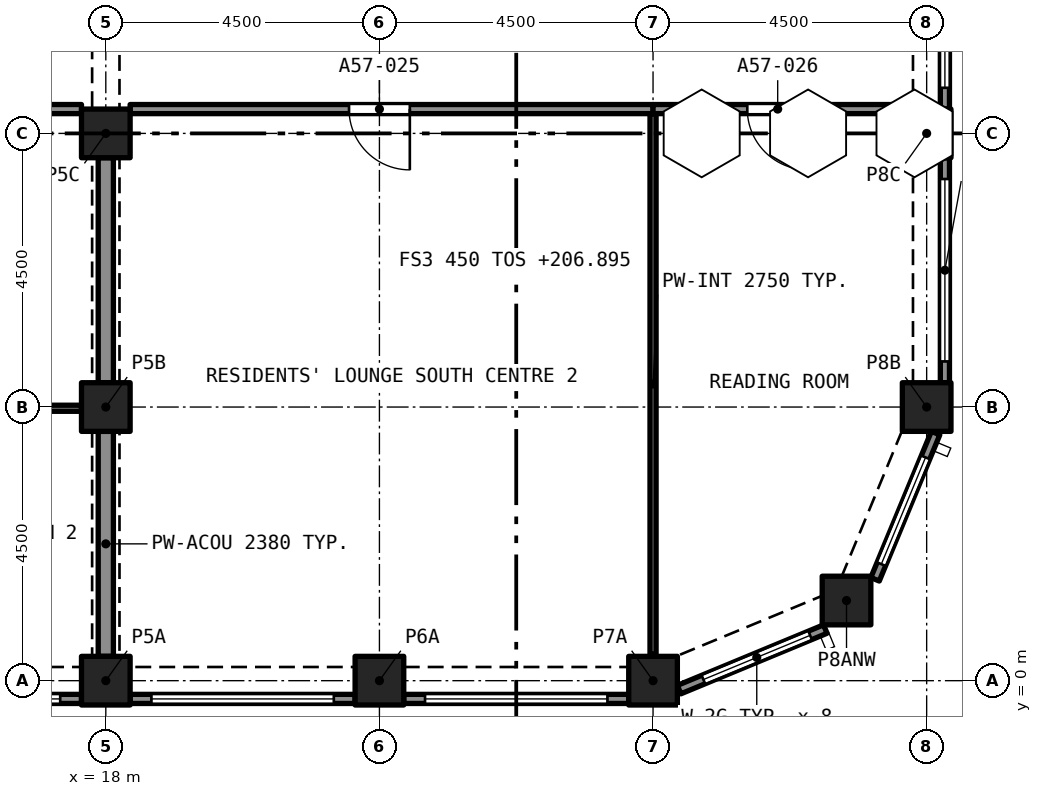
"""IFC4 building model, lengths in metres.
Left out: names, types, materials, properties, quantities, classifications, styles, units other than length and angle.
Written with IfcOpenShell. Run it as: python <this file> out.ifc"""

import sys

from ifc_helpers import new_model, si_unit, direction, frame, frame_2d, origin, origin_2d, place, context, subcontext, project, spatial, rectangle, extrude, element, fill, save


model = new_model("IFC4")
c1 = context("Model", 3, precision=1e-05, world=origin(), true_north=direction((0.0, 1.0)))
c2 = subcontext(c1, "Body", "Model", "MODEL_VIEW")
j1 = project(units=[si_unit("LENGTHUNIT", "METRE"), si_unit("PLANEANGLEUNIT", "RADIAN")], contexts=[c1])
p1 = place(None, origin())
s1 = spatial("IfcSite", under=j1, at=p1, CompositionType="ELEMENT")
p2 = place(p1, origin())
s2 = spatial("IfcBuilding", under=s1, at=p2, CompositionType="ELEMENT")
p3 = place(p2, frame((0.0, 0.0, 206.895)))
s3 = spatial("IfcBuildingStorey", under=s2, at=p3, CompositionType="ELEMENT", Elevation=206.895)
for number, where, z_axis, x_axis in (
    (1, (18.0, 0.0, 0.0), (0.0, 0.0, 1.0), (1.0, 0.0, 0.0)),
    (2, (22.5, 0.0, 0.0), (0.0, 0.0, 1.0), (1.0, 0.0, 0.0)),
    (3, (27.0, 0.0, 0.0), (0.0, 0.0, 1.0), (1.0, 0.0, 0.0)),
    (4, (30.182, 1.318, 0.0), (0.0, 0.0, 1.0), (1.0, 0.0, 0.0)),
    (5, (18.0, 4.5, 0.0), (0.0, 0.0, 1.0), (1.0, 0.0, 0.0)),
    (6, (31.5, 4.5, 0.0), (0.0, 0.0, 1.0), (1.0, 0.0, 0.0)),
    (7, (18.0, 9.0, 0.0), (0.0, 0.0, 1.0), (1.0, 0.0, 0.0)),
    (8, (31.5, 9.0, 0.0), (0.0, 0.0, 1.0), (1.0, 0.0, 0.0)),
):
    element("IfcColumn", number, at=place(p3, frame(where, z_axis=z_axis, x_axis=x_axis)), inside=s3, PredefinedType="COLUMN", context=c2, shape_type="SweptSolid", body=[
        extrude(rectangle(XDim=0.8, YDim=0.8, at=origin_2d()), origin(), (0.0, 0.0, 1.0), 3.2),
    ])
p4 = place(p3, frame((29.833, 0.849, 0.0), z_axis=(0.0, 0.0, 1.0), x_axis=(-0.923885342263, -0.382669406082, 0.0)))
e9 = element("IfcWall", 9, at=p4, inside=s3, PredefinedType="SOLIDWALL", context=c2, shape_type="SweptSolid", body=[
    extrude(rectangle(XDim=2.602, YDim=0.15, at=frame_2d((1.301, 0.0))), origin(), (0.0, 0.0, 1.0), 3.2),
])
p5 = place(p4, frame((0.27, 0.0, 0.45)))
e10 = element("IfcOpeningElement", 10, at=p5, cuts=e9, PredefinedType="OPENING", context=c2, shape_type="SweptSolid", body=[
    extrude(rectangle(XDim=1.9, YDim=1.95, at=frame_2d((0.95, 0.975))), frame((0.0, 0.085, 0.0), z_axis=(0.0, -1.0, 0.0), x_axis=(1.0, 0.0, 0.0)), (0.0, 0.0, 1.0), 0.17),
])
p6 = place(p3, frame((31.647, 4.071, 0.0), z_axis=(0.0, 0.0, 1.0), x_axis=(-0.382669406082, -0.923885342263, 0.0)))
e11 = element("IfcWall", 11, at=p6, inside=s3, PredefinedType="SOLIDWALL", context=c2, shape_type="SweptSolid", body=[
    extrude(rectangle(XDim=2.602, YDim=0.15, at=frame_2d((1.301, 0.0))), origin(), (0.0, 0.0, 1.0), 3.2),
])
p7 = place(p6, frame((0.432, 0.0, 0.45)))
e12 = element("IfcOpeningElement", 12, at=p7, cuts=e11, PredefinedType="OPENING", context=c2, shape_type="SweptSolid", body=[
    extrude(rectangle(XDim=1.9, YDim=1.95, at=frame_2d((0.95, 0.975))), frame((0.0, 0.085, 0.0), z_axis=(0.0, -1.0, 0.0), x_axis=(1.0, 0.0, 0.0)), (0.0, 0.0, 1.0), 0.17),
])
p8 = place(p3, frame((31.8, 8.6, 0.0), z_axis=(0.0, 0.0, 1.0), x_axis=(0.0, -1.0, 0.0)))
e13 = element("IfcWall", 13, at=p8, inside=s3, PredefinedType="SOLIDWALL", context=c2, shape_type="SweptSolid", body=[
    extrude(rectangle(XDim=3.7, YDim=0.15, at=frame_2d((1.85, 0.0))), origin(), (0.0, 0.0, 1.0), 3.2),
])
p9 = place(p8, frame((0.35, 0.0, 0.45)))
e14 = element("IfcOpeningElement", 14, at=p9, cuts=e13, PredefinedType="OPENING", context=c2, shape_type="SweptSolid", body=[
    extrude(rectangle(XDim=3.0, YDim=1.95, at=frame_2d((1.5, 0.975))), frame((0.0, 0.085, 0.0), z_axis=(0.0, -1.0, 0.0), x_axis=(1.0, 0.0, 0.0)), (0.0, 0.0, 1.0), 0.17),
])
p10 = place(p3, frame((31.8, 13.1, 0.0), z_axis=(0.0, 0.0, 1.0), x_axis=(0.0, -1.0, 0.0)))
e15 = element("IfcWall", 15, at=p10, inside=s3, PredefinedType="SOLIDWALL", context=c2, shape_type="SweptSolid", body=[
    extrude(rectangle(XDim=3.7, YDim=0.15, at=frame_2d((1.85, 0.0))), origin(), (0.0, 0.0, 1.0), 3.2),
])
p11 = place(p10, frame((0.35, 0.0, 0.45)))
e16 = element("IfcOpeningElement", 16, at=p11, cuts=e15, PredefinedType="OPENING", context=c2, shape_type="SweptSolid", body=[
    extrude(rectangle(XDim=3.0, YDim=1.95, at=frame_2d((1.5, 0.975))), frame((0.0, 0.085, 0.0), z_axis=(0.0, -1.0, 0.0), x_axis=(1.0, 0.0, 0.0)), (0.0, 0.0, 1.0), 0.17),
])
p12 = place(p3, frame((17.6, -0.3, 0.0), z_axis=(0.0, 0.0, 1.0), x_axis=(-1.0, 0.0, 0.0)))
e17 = element("IfcWall", 17, at=p12, inside=s3, PredefinedType="SOLIDWALL", context=c2, shape_type="SweptSolid", body=[
    extrude(rectangle(XDim=3.7, YDim=0.15, at=frame_2d((1.85, 0.0))), origin(), (0.0, 0.0, 1.0), 3.2),
])
p13 = place(p12, frame((0.35, 0.0, 0.45)))
e18 = element("IfcOpeningElement", 18, at=p13, cuts=e17, PredefinedType="OPENING", context=c2, shape_type="SweptSolid", body=[
    extrude(rectangle(XDim=3.0, YDim=1.95, at=frame_2d((1.5, 0.975))), frame((0.0, 0.085, 0.0), z_axis=(0.0, -1.0, 0.0), x_axis=(1.0, 0.0, 0.0)), (0.0, 0.0, 1.0), 0.17),
])
p14 = place(p3, frame((22.1, -0.3, 0.0), z_axis=(0.0, 0.0, 1.0), x_axis=(-1.0, 0.0, 0.0)))
e19 = element("IfcWall", 19, at=p14, inside=s3, PredefinedType="SOLIDWALL", context=c2, shape_type="SweptSolid", body=[
    extrude(rectangle(XDim=3.7, YDim=0.15, at=frame_2d((1.85, 0.0))), origin(), (0.0, 0.0, 1.0), 3.2),
])
p15 = place(p14, frame((0.35, 0.0, 0.45)))
e20 = element("IfcOpeningElement", 20, at=p15, cuts=e19, PredefinedType="OPENING", context=c2, shape_type="SweptSolid", body=[
    extrude(rectangle(XDim=3.0, YDim=1.95, at=frame_2d((1.5, 0.975))), frame((0.0, 0.085, 0.0), z_axis=(0.0, -1.0, 0.0), x_axis=(1.0, 0.0, 0.0)), (0.0, 0.0, 1.0), 0.17),
])
p16 = place(p3, frame((26.6, -0.3, 0.0), z_axis=(0.0, 0.0, 1.0), x_axis=(-1.0, 0.0, 0.0)))
e21 = element("IfcWall", 21, at=p16, inside=s3, PredefinedType="SOLIDWALL", context=c2, shape_type="SweptSolid", body=[
    extrude(rectangle(XDim=3.7, YDim=0.15, at=frame_2d((1.85, 0.0))), origin(), (0.0, 0.0, 1.0), 3.2),
])
p17 = place(p16, frame((0.35, 0.0, 0.45)))
e22 = element("IfcOpeningElement", 22, at=p17, cuts=e21, PredefinedType="OPENING", context=c2, shape_type="SweptSolid", body=[
    extrude(rectangle(XDim=3.0, YDim=1.95, at=frame_2d((1.5, 0.975))), frame((0.0, 0.085, 0.0), z_axis=(0.0, -1.0, 0.0), x_axis=(1.0, 0.0, 0.0)), (0.0, 0.0, 1.0), 0.17),
])
p18 = place(p3, frame((17.6, 4.48, 0.0), z_axis=(0.0, 0.0, 1.0), x_axis=(-1.0, 0.0, 0.0)))
e23 = element("IfcWall", 23, at=p18, inside=s3, PredefinedType="PARTITIONING", context=c2, shape_type="SweptSolid", body=[
    extrude(rectangle(XDim=4.1, YDim=0.1, at=frame_2d((2.05, 0.0))), origin(), (0.0, 0.0, 1.0), 2.9),
])
p19 = place(p18, frame((1.4, 0.0, 0.0)))
e24 = element("IfcOpeningElement", 24, at=p19, cuts=e23, PredefinedType="OPENING", context=c2, shape_type="SweptSolid", body=[
    extrude(rectangle(XDim=0.9, YDim=2.1, at=frame_2d((0.45, 1.05))), frame((0.0, 0.06, 0.0), z_axis=(0.0, -1.0, 0.0), x_axis=(1.0, 0.0, 0.0)), (0.0, 0.0, 1.0), 0.12),
])
for number, where, z_axis, x_axis in (
    (25, (18.0, 0.4, 0.0), (0.0, 0.0, 1.0), (0.0, 1.0, 0.0)),
    (26, (18.0, 4.9, 0.0), (0.0, 0.0, 1.0), (0.0, 1.0, 0.0)),
):
    element("IfcWall", number, at=place(p3, frame(where, z_axis=z_axis, x_axis=x_axis)), inside=s3, PredefinedType="PARTITIONING", context=c2, shape_type="SweptSolid", body=[
        extrude(rectangle(XDim=3.7, YDim=0.25, at=frame_2d((1.85, 0.0))), origin(), (0.0, 0.0, 1.0), 2.38),
    ])
p20 = place(p3, frame((17.6, 9.4, 0.0), z_axis=(0.0, 0.0, 1.0), x_axis=(-1.0, 0.0, 0.0)))
e27 = element("IfcWall", 27, at=p20, inside=s3, PredefinedType="PARTITIONING", context=c2, shape_type="SweptSolid", body=[
    extrude(rectangle(XDim=2.65, YDim=0.15, at=frame_2d((1.325, 0.0))), origin(), (0.0, 0.0, 1.0), 2.9),
])
p21 = place(p20, frame((1.25, 0.0, 0.0)))
e28 = element("IfcOpeningElement", 28, at=p21, cuts=e27, PredefinedType="OPENING", context=c2, shape_type="SweptSolid", body=[
    extrude(rectangle(XDim=1.2, YDim=2.4, at=frame_2d((0.6, 1.2))), frame((0.0, 0.085, 0.0), z_axis=(0.0, -1.0, 0.0), x_axis=(1.0, 0.0, 0.0)), (0.0, 0.0, 1.0), 0.17),
])
p22 = place(p3, frame((27.0, 0.433, 0.0), z_axis=(0.0, 0.0, 1.0), x_axis=(0.0, 1.0, 0.0)))
e29 = element("IfcWall", 29, at=p22, inside=s3, PredefinedType="PARTITIONING", context=c2, shape_type="SweptSolid", body=[
    extrude(rectangle(XDim=8.892, YDim=0.1, at=frame_2d((4.446, 0.0))), origin(), (0.0, 0.0, 1.0), 2.75),
])
p23 = place(p3, frame((27.0, 9.4, 0.0), z_axis=(0.0, 0.0, 1.0), x_axis=(-1.0, 0.0, 0.0)))
e30 = element("IfcWall", 30, at=p23, inside=s3, PredefinedType="PARTITIONING", context=c2, shape_type="SweptSolid", body=[
    extrude(rectangle(XDim=8.6, YDim=0.15, at=frame_2d((4.3, 0.0))), origin(), (0.0, 0.0, 1.0), 2.75),
])
p24 = place(p23, frame((4.0, 0.0, 0.0)))
e31 = element("IfcOpeningElement", 31, at=p24, cuts=e30, PredefinedType="OPENING", context=c2, shape_type="SweptSolid", body=[
    extrude(rectangle(XDim=1.0, YDim=2.1, at=frame_2d((0.5, 1.05))), frame((0.0, 0.085, 0.0), z_axis=(0.0, -1.0, 0.0), x_axis=(1.0, 0.0, 0.0)), (0.0, 0.0, 1.0), 0.17),
])
p25 = place(p3, frame((31.1, 9.4, 0.0), z_axis=(0.0, 0.0, 1.0), x_axis=(-1.0, 0.0, 0.0)))
e32 = element("IfcWall", 32, at=p25, inside=s3, PredefinedType="PARTITIONING", context=c2, shape_type="SweptSolid", body=[
    extrude(rectangle(XDim=4.1, YDim=0.15, at=frame_2d((2.05, 0.0))), origin(), (0.0, 0.0, 1.0), 2.75),
])
p26 = place(p25, frame((1.55, 0.0, 0.0)))
e33 = element("IfcOpeningElement", 33, at=p26, cuts=e32, PredefinedType="OPENING", context=c2, shape_type="SweptSolid", body=[
    extrude(rectangle(XDim=1.0, YDim=2.1, at=frame_2d((0.5, 1.05))), frame((0.0, 0.085, 0.0), z_axis=(0.0, -1.0, 0.0), x_axis=(1.0, 0.0, 0.0)), (0.0, 0.0, 1.0), 0.17),
])
p27 = place(p5, origin())
e34 = element("IfcWindow", 34, at=p27, inside=s3, PartitioningType="SINGLE_PANEL", PredefinedType="WINDOW", context=c2, shape_type="SweptSolid", body=[
    extrude(rectangle(XDim=1.9, YDim=1.95, at=frame_2d((0.95, 0.975))), frame((0.0, 0.03, 0.0), z_axis=(0.0, -1.0, 0.0), x_axis=(1.0, 0.0, 0.0)), (0.0, 0.0, 1.0), 0.06),
])
fill(e10, e34)
p28 = place(p7, origin())
e35 = element("IfcWindow", 35, at=p28, inside=s3, PartitioningType="SINGLE_PANEL", PredefinedType="WINDOW", context=c2, shape_type="SweptSolid", body=[
    extrude(rectangle(XDim=1.9, YDim=1.95, at=frame_2d((0.95, 0.975))), frame((0.0, 0.03, 0.0), z_axis=(0.0, -1.0, 0.0), x_axis=(1.0, 0.0, 0.0)), (0.0, 0.0, 1.0), 0.06),
])
fill(e12, e35)
p29 = place(p9, origin())
e36 = element("IfcWindow", 36, at=p29, inside=s3, PartitioningType="SINGLE_PANEL", PredefinedType="WINDOW", context=c2, shape_type="SweptSolid", body=[
    extrude(rectangle(XDim=3.0, YDim=1.95, at=frame_2d((1.5, 0.975))), frame((0.0, 0.03, 0.0), z_axis=(0.0, -1.0, 0.0), x_axis=(1.0, 0.0, 0.0)), (0.0, 0.0, 1.0), 0.06),
])
fill(e14, e36)
p30 = place(p11, origin())
e37 = element("IfcWindow", 37, at=p30, inside=s3, PartitioningType="SINGLE_PANEL", PredefinedType="WINDOW", context=c2, shape_type="SweptSolid", body=[
    extrude(rectangle(XDim=3.0, YDim=1.95, at=frame_2d((1.5, 0.975))), frame((0.0, 0.03, 0.0), z_axis=(0.0, -1.0, 0.0), x_axis=(1.0, 0.0, 0.0)), (0.0, 0.0, 1.0), 0.06),
])
fill(e16, e37)
p31 = place(p13, origin())
e38 = element("IfcWindow", 38, at=p31, inside=s3, PartitioningType="SINGLE_PANEL", PredefinedType="WINDOW", context=c2, shape_type="SweptSolid", body=[
    extrude(rectangle(XDim=3.0, YDim=1.95, at=frame_2d((1.5, 0.975))), frame((0.0, 0.03, 0.0), z_axis=(0.0, -1.0, 0.0), x_axis=(1.0, 0.0, 0.0)), (0.0, 0.0, 1.0), 0.06),
])
fill(e18, e38)
p32 = place(p15, origin())
e39 = element("IfcWindow", 39, at=p32, inside=s3, PartitioningType="SINGLE_PANEL", PredefinedType="WINDOW", context=c2, shape_type="SweptSolid", body=[
    extrude(rectangle(XDim=3.0, YDim=1.95, at=frame_2d((1.5, 0.975))), frame((0.0, 0.03, 0.0), z_axis=(0.0, -1.0, 0.0), x_axis=(1.0, 0.0, 0.0)), (0.0, 0.0, 1.0), 0.06),
])
fill(e20, e39)
p33 = place(p17, origin())
e40 = element("IfcWindow", 40, at=p33, inside=s3, PartitioningType="SINGLE_PANEL", PredefinedType="WINDOW", context=c2, shape_type="SweptSolid", body=[
    extrude(rectangle(XDim=3.0, YDim=1.95, at=frame_2d((1.5, 0.975))), frame((0.0, 0.03, 0.0), z_axis=(0.0, -1.0, 0.0), x_axis=(1.0, 0.0, 0.0)), (0.0, 0.0, 1.0), 0.06),
])
fill(e22, e40)
p34 = place(p24, origin())
e41 = element("IfcDoor", 41, at=p34, inside=s3, OperationType="SINGLE_SWING_RIGHT", PredefinedType="DOOR", context=c2, shape_type="SweptSolid", body=[
    extrude(rectangle(XDim=1.0, YDim=2.1, at=frame_2d((0.5, 1.05))), frame((0.0, 0.025, 0.0), z_axis=(0.0, -1.0, 0.0), x_axis=(1.0, 0.0, 0.0)), (0.0, 0.0, 1.0), 0.05),
])
fill(e31, e41)
p35 = place(p26, origin())
e42 = element("IfcDoor", 42, at=p35, inside=s3, OperationType="SINGLE_SWING_RIGHT", PredefinedType="DOOR", context=c2, shape_type="SweptSolid", body=[
    extrude(rectangle(XDim=1.0, YDim=2.1, at=frame_2d((0.5, 1.05))), frame((0.0, 0.025, 0.0), z_axis=(0.0, -1.0, 0.0), x_axis=(1.0, 0.0, 0.0)), (0.0, 0.0, 1.0), 0.05),
])
fill(e33, e42)
save(model, sys.argv[1])
